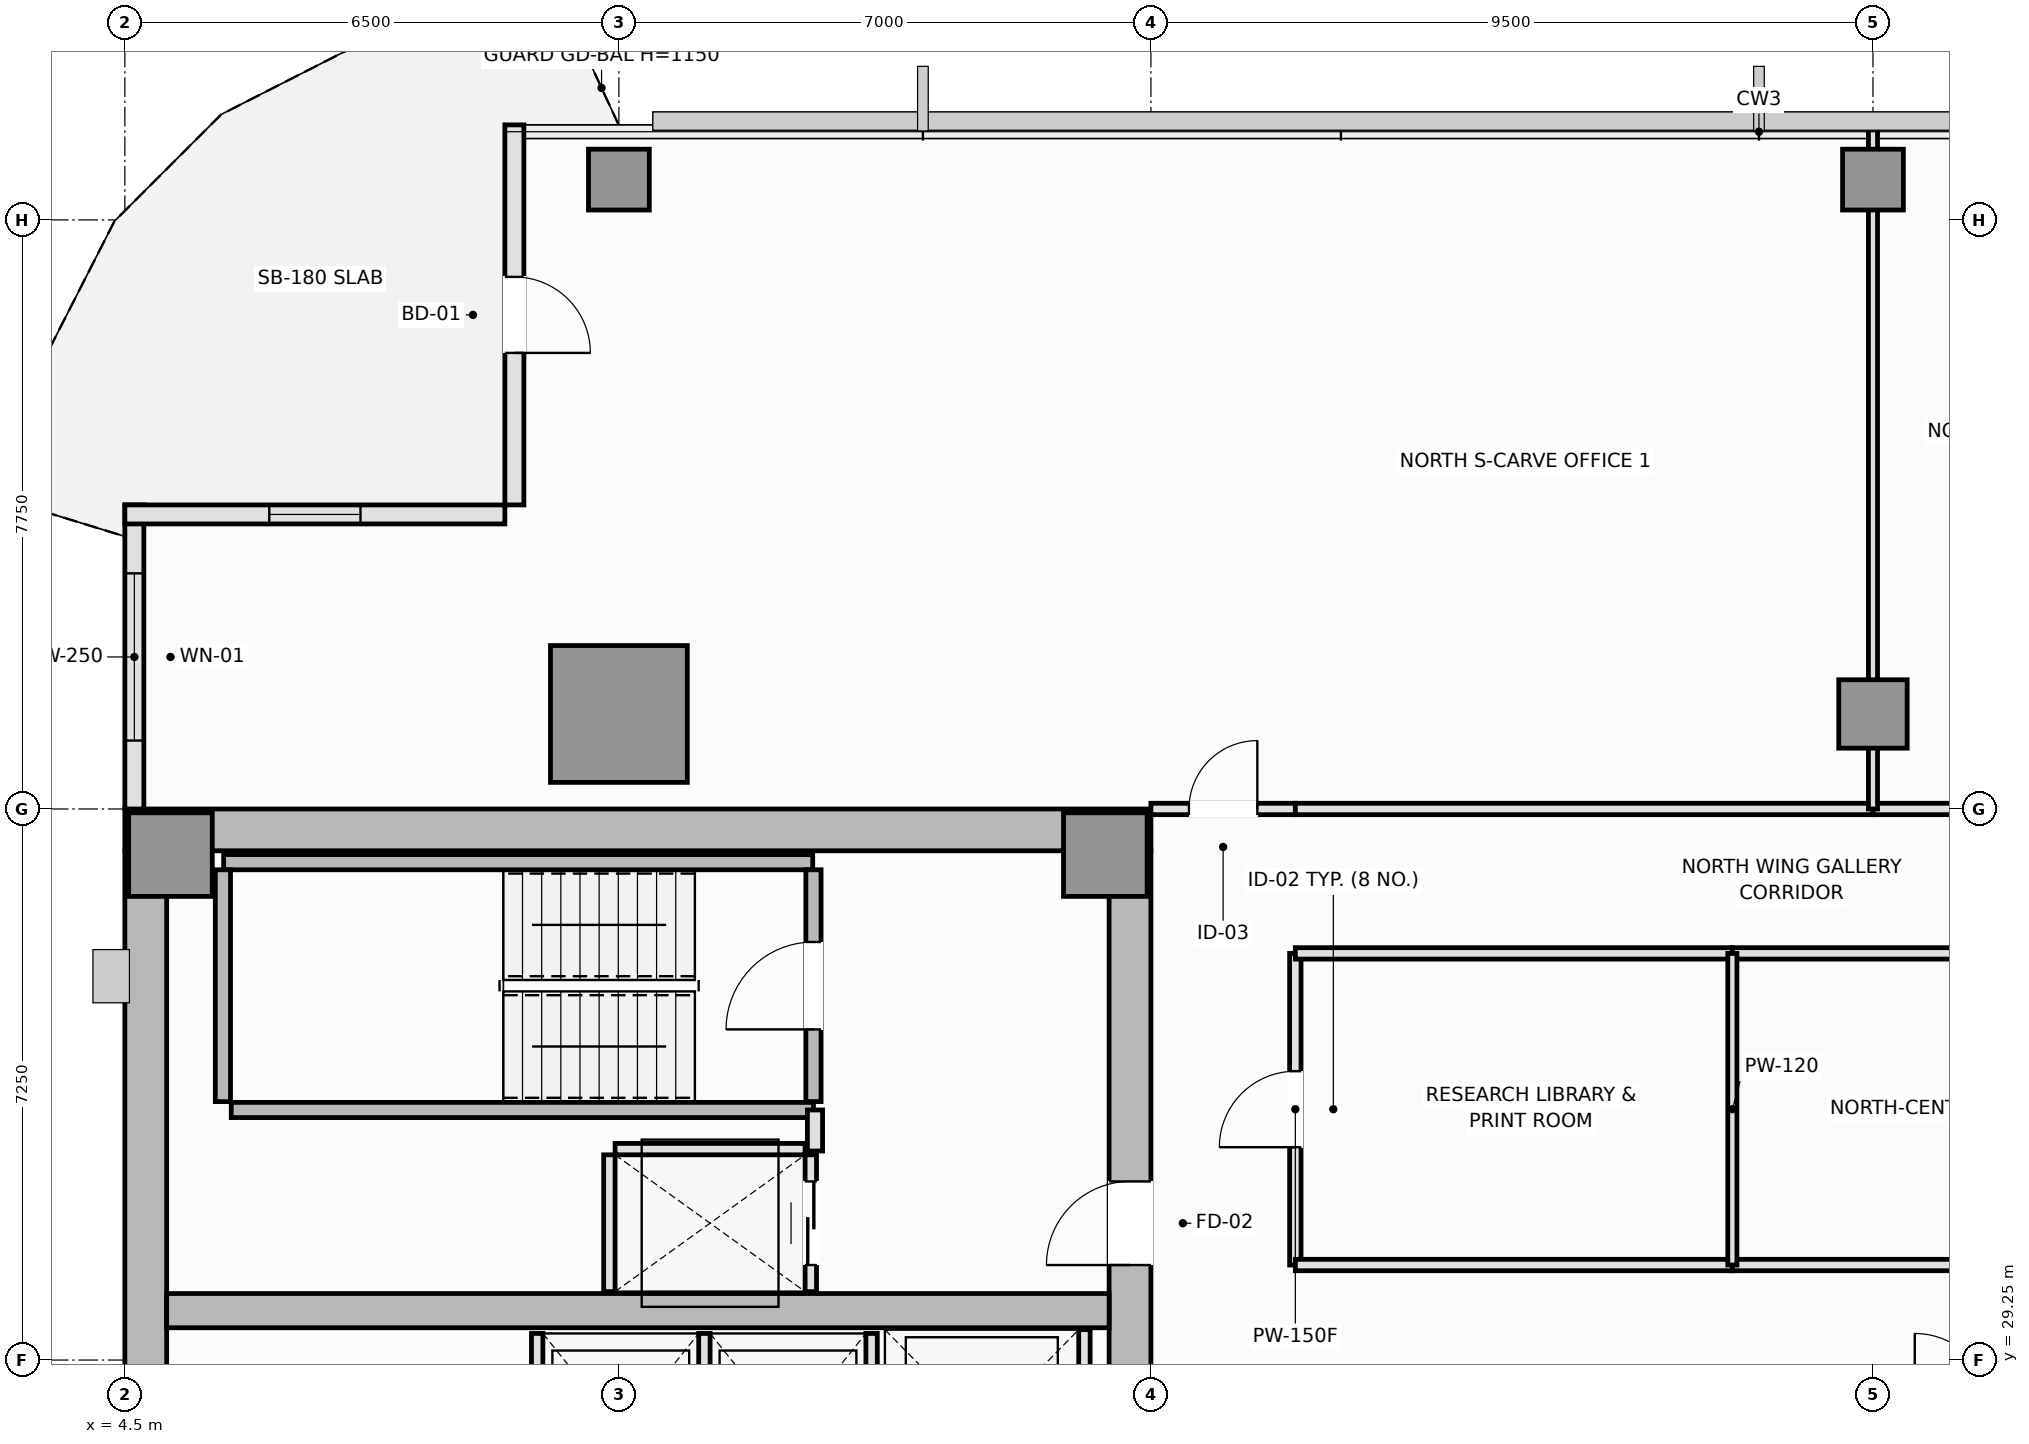
"""IFC4 building model, lengths in metres.
Left out: names, types, materials, properties, quantities, classifications, styles, units other than length and angle.
Written with IfcOpenShell. Run it as: python <this file> out.ifc"""

import sys

from ifc_helpers import new_model, si_unit, direction, frame, frame_2d, origin, origin_2d, place, context, subcontext, project, spatial, rectangle, extrude, element, fill, save


model = new_model("IFC4")
c1 = context("Model", 3, precision=1e-05, world=origin(), true_north=direction((0.0, 1.0)))
c2 = subcontext(c1, "Body", "Model", "MODEL_VIEW")
j1 = project(units=[si_unit("LENGTHUNIT", "METRE"), si_unit("PLANEANGLEUNIT", "RADIAN")], contexts=[c1])
p1 = place(None, origin())
s1 = spatial("IfcSite", under=j1, at=p1, CompositionType="ELEMENT")
p2 = place(p1, origin())
s2 = spatial("IfcBuilding", under=s1, at=p2, CompositionType="ELEMENT")
p3 = place(p2, frame((0.0, 0.0, 234.2)))
s3 = spatial("IfcBuildingStorey", under=s2, at=p3, CompositionType="ELEMENT", Elevation=234.2)
p4 = place(p3, frame((4.5, 36.225, 0.0), z_axis=(0.0, 0.0, 1.0), x_axis=(1.0, 0.0, 0.0)))
e1 = element("IfcWall", 1, at=p4, inside=s3, PredefinedType="SHEAR", context=c2, shape_type="SweptSolid", body=[
    extrude(rectangle(XDim=13.5, YDim=0.55, at=frame_2d((6.75, 0.0))), origin(), (0.0, 0.0, 1.0), 3.55),
])
p5 = place(p3, frame((4.775, 14.55, 0.0), z_axis=(0.0, 0.0, 1.0), x_axis=(0.0, 1.0, 0.0)))
e2 = element("IfcWall", 2, at=p5, inside=s3, PredefinedType="SHEAR", context=c2, shape_type="SweptSolid", body=[
    extrude(rectangle(XDim=21.4, YDim=0.55, at=frame_2d((10.7, 0.0))), origin(), (0.0, 0.0, 1.0), 3.55),
])
p6 = place(p3, frame((17.725, 27.05, 0.0), z_axis=(0.0, 0.0, 1.0), x_axis=(0.0, 1.0, 0.0)))
e3 = element("IfcWall", 3, at=p6, inside=s3, PredefinedType="SHEAR", context=c2, shape_type="SweptSolid", body=[
    extrude(rectangle(XDim=8.9, YDim=0.55, at=frame_2d((4.45, 0.0))), origin(), (0.0, 0.0, 1.0), 3.55),
])
p7 = place(p6, frame((3.45, 0.0, 0.0)))
e4 = element("IfcOpeningElement", 4, at=p7, cuts=e3, PredefinedType="OPENING", context=c2, shape_type="SweptSolid", body=[
    extrude(rectangle(XDim=1.1, YDim=2.15, at=frame_2d((0.55, 1.075))), frame((0.0, 0.285, 0.0), z_axis=(0.0, -1.0, 0.0), x_axis=(1.0, 0.0, 0.0)), (0.0, 0.0, 1.0), 0.57),
])
p8 = place(p3, frame((5.05, 29.9, 0.0), z_axis=(0.0, 0.0, 1.0), x_axis=(1.0, 0.0, 0.0)))
e5 = element("IfcWall", 5, at=p8, inside=s3, PredefinedType="SHEAR", context=c2, shape_type="SweptSolid", body=[
    extrude(rectangle(XDim=12.4, YDim=0.45, at=frame_2d((6.2, 0.0))), origin(), (0.0, 0.0, 1.0), 3.55),
])
for number, where, z_axis, x_axis in (
    (6, (5.1, 35.9, 0.0), (0.0, 0.0, 1.0), (1.0, 0.0, 0.0)),
    (7, (17.4, 35.9, 0.0), (0.0, 0.0, 1.0), (1.0, 0.0, 0.0)),
):
    element("IfcColumn", number, at=place(p3, frame(where, z_axis=z_axis, x_axis=x_axis)), inside=s3, PredefinedType="PILASTER", context=c2, shape_type="SweptSolid", body=[
        extrude(rectangle(XDim=1.1, YDim=1.1, at=origin_2d()), origin(), (0.0, 0.0, 1.0), 3.55),
    ])
p9 = place(p3, frame((11.0, 37.75, 0.0), z_axis=(0.0, 0.0, 1.0), x_axis=(1.0, 0.0, 0.0)))
e8 = element("IfcColumn", 8, at=p9, inside=s3, PredefinedType="COLUMN", context=c2, shape_type="SweptSolid", body=[
    extrude(rectangle(XDim=1.8, YDim=1.8, at=origin_2d()), origin(), (0.0, 0.0, 1.0), 3.55),
])
p10 = place(p3, frame((27.5, 37.75, 0.0), z_axis=(0.0, 0.0, 1.0), x_axis=(1.0, 0.0, 0.0)))
e9 = element("IfcColumn", 9, at=p10, inside=s3, PredefinedType="COLUMN", context=c2, shape_type="SweptSolid", body=[
    extrude(rectangle(XDim=0.9, YDim=0.9, at=origin_2d()), origin(), (0.0, 0.0, 1.0), 3.55),
])
for number, where, z_axis, x_axis in (
    (10, (11.0, 44.78, 0.0), (0.0, 0.0, 1.0), (1.0, 0.0, 0.0)),
    (11, (27.5, 44.78, 0.0), (0.0, 0.0, 1.0), (1.0, 0.0, 0.0)),
):
    element("IfcColumn", number, at=place(p3, frame(where, z_axis=z_axis, x_axis=x_axis)), inside=s3, PredefinedType="COLUMN", context=c2, shape_type="SweptSolid", body=[
        extrude(rectangle(XDim=0.8, YDim=0.8, at=origin_2d()), origin(), (0.0, 0.0, 1.0), 3.55),
    ])
p11 = place(p3, frame((4.625, 40.5, 0.0), z_axis=(0.0, 0.0, 1.0), x_axis=(0.0, -1.0, 0.0)))
e12 = element("IfcWall", 12, at=p11, inside=s3, PredefinedType="SOLIDWALL", context=c2, shape_type="SweptSolid", body=[
    extrude(rectangle(XDim=4.0, YDim=0.25, at=frame_2d((2.0, 0.0))), origin(), (0.0, 0.0, 1.0), 3.37),
])
p12 = place(p11, frame((0.9, 0.0, 0.9)))
e13 = element("IfcOpeningElement", 13, at=p12, cuts=e12, PredefinedType="OPENING", context=c2, shape_type="SweptSolid", body=[
    extrude(rectangle(XDim=2.2, YDim=1.8, at=frame_2d((1.1, 0.9))), frame((0.0, 0.135, 0.0), z_axis=(0.0, -1.0, 0.0), x_axis=(1.0, 0.0, 0.0)), (0.0, 0.0, 1.0), 0.27),
])
p13 = place(p3, frame((9.625, 45.5, 0.0), z_axis=(0.0, 0.0, 1.0), x_axis=(0.0, -1.0, 0.0)))
e14 = element("IfcWall", 14, at=p13, inside=s3, PredefinedType="SOLIDWALL", context=c2, shape_type="SweptSolid", body=[
    extrude(rectangle(XDim=5.0, YDim=0.25, at=frame_2d((2.5, 0.0))), origin(), (0.0, 0.0, 1.0), 3.1),
])
p14 = place(p13, frame((2.0, 0.0, 0.0)))
e15 = element("IfcOpeningElement", 15, at=p14, cuts=e14, PredefinedType="OPENING", context=c2, shape_type="SweptSolid", body=[
    extrude(rectangle(XDim=1.0, YDim=2.2, at=frame_2d((0.5, 1.1))), frame((0.0, 0.135, 0.0), z_axis=(0.0, -1.0, 0.0), x_axis=(1.0, 0.0, 0.0)), (0.0, 0.0, 1.0), 0.27),
])
p15 = place(p3, frame((9.5, 40.375, 0.0), z_axis=(0.0, 0.0, 1.0), x_axis=(-1.0, 0.0, 0.0)))
e16 = element("IfcWall", 16, at=p15, inside=s3, PredefinedType="SOLIDWALL", context=c2, shape_type="SweptSolid", body=[
    extrude(rectangle(XDim=5.0, YDim=0.25, at=frame_2d((2.5, 0.0))), origin(), (0.0, 0.0, 1.0), 3.37),
])
p16 = place(p15, frame((1.9, 0.0, 0.9)))
e17 = element("IfcOpeningElement", 17, at=p16, cuts=e16, PredefinedType="OPENING", context=c2, shape_type="SweptSolid", body=[
    extrude(rectangle(XDim=1.2, YDim=1.8, at=frame_2d((0.6, 0.9))), frame((0.0, 0.135, 0.0), z_axis=(0.0, -1.0, 0.0), x_axis=(1.0, 0.0, 0.0)), (0.0, 0.0, 1.0), 0.27),
])
p17 = place(p3, frame((5.8, 35.8, 0.0), z_axis=(0.0, 0.0, 1.0), x_axis=(1.0, 0.0, 0.0)))
e18 = element("IfcWall", 18, at=p17, inside=s3, PredefinedType="SOLIDWALL", context=c2, shape_type="SweptSolid", body=[
    extrude(rectangle(XDim=7.75, YDim=0.2, at=frame_2d((3.875, 0.0))), origin(), (0.0, 0.0, 1.0), 3.55),
])
p18 = place(p3, frame((5.79, 32.65, 0.0), z_axis=(0.0, 0.0, 1.0), x_axis=(0.0, 1.0, 0.0)))
e19 = element("IfcWall", 19, at=p18, inside=s3, PredefinedType="SOLIDWALL", context=c2, shape_type="SweptSolid", body=[
    extrude(rectangle(XDim=3.05, YDim=0.2, at=frame_2d((1.525, 0.0))), origin(), (0.0, 0.0, 1.0), 3.55),
])
p19 = place(p3, frame((5.9, 32.54, 0.0), z_axis=(0.0, 0.0, 1.0), x_axis=(1.0, 0.0, 0.0)))
e20 = element("IfcWall", 20, at=p19, inside=s3, PredefinedType="SOLIDWALL", context=c2, shape_type="SweptSolid", body=[
    extrude(rectangle(XDim=7.66, YDim=0.2, at=frame_2d((3.83, 0.0))), origin(), (0.0, 0.0, 1.0), 3.55),
])
p20 = place(p3, frame((13.56, 32.65, 0.0), z_axis=(0.0, 0.0, 1.0), x_axis=(0.0, 1.0, 0.0)))
e21 = element("IfcWall", 21, at=p20, inside=s3, PredefinedType="SOLIDWALL", context=c2, shape_type="SweptSolid", body=[
    extrude(rectangle(XDim=3.05, YDim=0.2, at=frame_2d((1.525, 0.0))), origin(), (0.0, 0.0, 1.0), 3.55),
])
p21 = place(p20, frame((0.95, 0.0, 0.0)))
e22 = element("IfcOpeningElement", 22, at=p21, cuts=e21, PredefinedType="OPENING", context=c2, shape_type="SweptSolid", body=[
    extrude(rectangle(XDim=1.15, YDim=2.15, at=frame_2d((0.575, 1.075))), frame((0.0, 0.11, 0.0), z_axis=(0.0, -1.0, 0.0), x_axis=(1.0, 0.0, 0.0)), (0.0, 0.0, 1.0), 0.22),
])
for number, where, z_axis, x_axis in (
    (23, (9.925, 27.05, 0.0), (0.0, 0.0, 1.0), (0.0, 1.0, 0.0)),
    (24, (12.125, 27.05, 0.0), (0.0, 0.0, 1.0), (0.0, 1.0, 0.0)),
    (25, (14.325, 27.05, 0.0), (0.0, 0.0, 1.0), (0.0, 1.0, 0.0)),
):
    element("IfcWall", number, at=place(p3, frame(where, z_axis=z_axis, x_axis=x_axis)), inside=s3, PredefinedType="PARTITIONING", context=c2, shape_type="SweptSolid", body=[
        extrude(rectangle(XDim=2.55, YDim=0.15, at=frame_2d((1.275, 0.0))), origin(), (0.0, 0.0, 1.0), 3.37),
    ])
p22 = place(p3, frame((17.125, 27.05, 0.0), z_axis=(0.0, 0.0, 1.0), x_axis=(0.0, 1.0, 0.0)))
e26 = element("IfcWall", 26, at=p22, inside=s3, PredefinedType="PARTITIONING", context=c2, shape_type="SweptSolid", body=[
    extrude(rectangle(XDim=2.6, YDim=0.15, at=frame_2d((1.3, 0.0))), origin(), (0.0, 0.0, 1.0), 3.37),
])
p23 = place(p3, frame((10.95, 32.025, 0.0), z_axis=(0.0, 0.0, 1.0), x_axis=(1.0, 0.0, 0.0)))
e27 = element("IfcWall", 27, at=p23, inside=s3, PredefinedType="PARTITIONING", context=c2, shape_type="SweptSolid", body=[
    extrude(rectangle(XDim=2.5, YDim=0.15, at=frame_2d((1.25, 0.0))), origin(), (0.0, 0.0, 1.0), 3.37),
])
p24 = place(p3, frame((10.875, 30.15, 0.0), z_axis=(0.0, 0.0, 1.0), x_axis=(0.0, 1.0, 0.0)))
e28 = element("IfcWall", 28, at=p24, inside=s3, PredefinedType="PARTITIONING", context=c2, shape_type="SweptSolid", body=[
    extrude(rectangle(XDim=1.8, YDim=0.15, at=frame_2d((0.9, 0.0))), origin(), (0.0, 0.0, 1.0), 3.37),
])
p25 = place(p3, frame((13.525, 30.15, 0.0), z_axis=(0.0, 0.0, 1.0), x_axis=(0.0, 1.0, 0.0)))
e29 = element("IfcWall", 29, at=p25, inside=s3, PredefinedType="PARTITIONING", context=c2, shape_type="SweptSolid", body=[
    extrude(rectangle(XDim=1.8, YDim=0.15, at=frame_2d((0.9, 0.0))), origin(), (0.0, 0.0, 1.0), 3.37),
])
p26 = place(p25, frame((0.35, 0.0, 0.0)))
e30 = element("IfcOpeningElement", 30, at=p26, cuts=e29, PredefinedType="OPENING", context=c2, shape_type="SweptSolid", body=[
    extrude(rectangle(XDim=1.1, YDim=2.2, at=frame_2d((0.55, 1.1))), frame((0.0, 0.085, 0.0), z_axis=(0.0, -1.0, 0.0), x_axis=(1.0, 0.0, 0.0)), (0.0, 0.0, 1.0), 0.17),
])
p27 = place(p3, frame((13.58, 32.0, 0.0), z_axis=(0.0, 0.0, 1.0), x_axis=(0.0, 1.0, 0.0)))
e31 = element("IfcWall", 31, at=p27, inside=s3, PredefinedType="PARTITIONING", context=c2, shape_type="SweptSolid", body=[
    extrude(rectangle(XDim=0.54, YDim=0.2, at=frame_2d((0.27, 0.0))), origin(), (0.0, 0.0, 1.0), 3.37),
])
p28 = place(p3, frame((19.9, 30.5, 0.0), z_axis=(0.0, 0.0, 1.0), x_axis=(0.0, 1.0, 0.0)))
e32 = element("IfcWall", 32, at=p28, inside=s3, PredefinedType="PARTITIONING", context=c2, shape_type="SweptSolid", body=[
    extrude(rectangle(XDim=4.1, YDim=0.15, at=frame_2d((2.05, 0.0))), origin(), (0.0, 0.0, 1.0), 3.37),
])
p29 = place(p28, frame((1.55, 0.0, 0.0)))
e33 = element("IfcOpeningElement", 33, at=p29, cuts=e32, PredefinedType="OPENING", context=c2, shape_type="SweptSolid", body=[
    extrude(rectangle(XDim=1.0, YDim=2.15, at=frame_2d((0.5, 1.075))), frame((0.0, 0.085, 0.0), z_axis=(0.0, -1.0, 0.0), x_axis=(1.0, 0.0, 0.0)), (0.0, 0.0, 1.0), 0.17),
])
p30 = place(p3, frame((18.0, 36.5, 0.0), z_axis=(0.0, 0.0, 1.0), x_axis=(1.0, 0.0, 0.0)))
e34 = element("IfcWall", 34, at=p30, inside=s3, PredefinedType="PARTITIONING", context=c2, shape_type="SweptSolid", body=[
    extrude(rectangle(XDim=1.9, YDim=0.15, at=frame_2d((0.95, 0.0))), origin(), (0.0, 0.0, 1.0), 3.37),
])
p31 = place(p30, frame((0.5, 0.0, 0.0)))
e35 = element("IfcOpeningElement", 35, at=p31, cuts=e34, PredefinedType="OPENING", context=c2, shape_type="SweptSolid", body=[
    extrude(rectangle(XDim=0.9, YDim=2.1, at=frame_2d((0.45, 1.05))), frame((0.0, 0.085, 0.0), z_axis=(0.0, -1.0, 0.0), x_axis=(1.0, 0.0, 0.0)), (0.0, 0.0, 1.0), 0.17),
])
p32 = place(p3, frame((19.9, 30.5, 0.0), z_axis=(0.0, 0.0, 1.0), x_axis=(1.0, 0.0, 0.0)))
e36 = element("IfcWall", 36, at=p32, inside=s3, PredefinedType="PARTITIONING", context=c2, shape_type="SweptSolid", body=[
    extrude(rectangle(XDim=5.75, YDim=0.15, at=frame_2d((2.875, 0.0))), origin(), (0.0, 0.0, 1.0), 3.37),
])
p33 = place(p3, frame((25.65, 30.5, 0.0), z_axis=(0.0, 0.0, 1.0), x_axis=(1.0, 0.0, 0.0)))
e37 = element("IfcWall", 37, at=p33, inside=s3, PredefinedType="PARTITIONING", context=c2, shape_type="SweptSolid", body=[
    extrude(rectangle(XDim=7.95, YDim=0.15, at=frame_2d((3.975, 0.0))), origin(), (0.0, 0.0, 1.0), 3.37),
])
p34 = place(p3, frame((19.9, 34.6, 0.0), z_axis=(0.0, 0.0, 1.0), x_axis=(1.0, 0.0, 0.0)))
e38 = element("IfcWall", 38, at=p34, inside=s3, PredefinedType="PARTITIONING", context=c2, shape_type="SweptSolid", body=[
    extrude(rectangle(XDim=5.75, YDim=0.15, at=frame_2d((2.875, 0.0))), origin(), (0.0, 0.0, 1.0), 3.37),
])
p35 = place(p3, frame((25.65, 34.6, 0.0), z_axis=(0.0, 0.0, 1.0), x_axis=(1.0, 0.0, 0.0)))
e39 = element("IfcWall", 39, at=p35, inside=s3, PredefinedType="PARTITIONING", context=c2, shape_type="SweptSolid", body=[
    extrude(rectangle(XDim=7.95, YDim=0.15, at=frame_2d((3.975, 0.0))), origin(), (0.0, 0.0, 1.0), 3.37),
])
p36 = place(p3, frame((19.9, 36.5, 0.0), z_axis=(0.0, 0.0, 1.0), x_axis=(1.0, 0.0, 0.0)))
e40 = element("IfcWall", 40, at=p36, inside=s3, PredefinedType="PARTITIONING", context=c2, shape_type="SweptSolid", body=[
    extrude(rectangle(XDim=7.6, YDim=0.15, at=frame_2d((3.8, 0.0))), origin(), (0.0, 0.0, 1.0), 3.37),
])
p37 = place(p3, frame((27.5, 36.5, 0.0), z_axis=(0.0, 0.0, 1.0), x_axis=(1.0, 0.0, 0.0)))
e41 = element("IfcWall", 41, at=p37, inside=s3, PredefinedType="PARTITIONING", context=c2, shape_type="SweptSolid", body=[
    extrude(rectangle(XDim=3.5, YDim=0.15, at=frame_2d((1.75, 0.0))), origin(), (0.0, 0.0, 1.0), 3.37),
])
p38 = place(p37, frame((1.25, 0.0, 0.0)))
e42 = element("IfcOpeningElement", 42, at=p38, cuts=e41, PredefinedType="OPENING", context=c2, shape_type="SweptSolid", body=[
    extrude(rectangle(XDim=1.0, YDim=2.15, at=frame_2d((0.5, 1.075))), frame((0.0, 0.085, 0.0), z_axis=(0.0, -1.0, 0.0), x_axis=(1.0, 0.0, 0.0)), (0.0, 0.0, 1.0), 0.17),
])
p39 = place(p3, frame((25.65, 30.5, 0.0), z_axis=(0.0, 0.0, 1.0), x_axis=(0.0, 1.0, 0.0)))
e43 = element("IfcWall", 43, at=p39, inside=s3, PredefinedType="PARTITIONING", context=c2, shape_type="SweptSolid", body=[
    extrude(rectangle(XDim=4.1, YDim=0.12, at=frame_2d((2.05, 0.0))), origin(), (0.0, 0.0, 1.0), 3.07),
])
p40 = place(p3, frame((27.5, 36.5, 0.0), z_axis=(0.0, 0.0, 1.0), x_axis=(0.0, 1.0, 0.0)))
e44 = element("IfcWall", 44, at=p40, inside=s3, PredefinedType="PARTITIONING", context=c2, shape_type="SweptSolid", body=[
    extrude(rectangle(XDim=8.99, YDim=0.12, at=frame_2d((4.495, 0.0))), origin(), (0.0, 0.0, 1.0), 2.92),
])
p41 = place(p12, origin())
e45 = element("IfcWindow", 45, at=p41, inside=s3, PartitioningType="SINGLE_PANEL", PredefinedType="WINDOW", context=c2, shape_type="SweptSolid", body=[
    extrude(rectangle(XDim=2.2, YDim=1.8, at=frame_2d((1.1, 0.9))), frame((0.0, 0.03, 0.0), z_axis=(0.0, -1.0, 0.0), x_axis=(1.0, 0.0, 0.0)), (0.0, 0.0, 1.0), 0.06),
])
fill(e13, e45)
p42 = place(p14, frame((1.0, 0.0, 0.0), z_axis=(0.0, 0.0, 1.0), x_axis=(-1.0, 0.0, 0.0)))
e46 = element("IfcDoor", 46, at=p42, inside=s3, OperationType="SINGLE_SWING_RIGHT", PredefinedType="DOOR", context=c2, shape_type="SweptSolid", body=[
    extrude(rectangle(XDim=1.0, YDim=2.2, at=frame_2d((0.5, 1.1))), frame((0.0, 0.025, 0.0), z_axis=(0.0, -1.0, 0.0), x_axis=(1.0, 0.0, 0.0)), (0.0, 0.0, 1.0), 0.05),
])
fill(e15, e46)
p43 = place(p16, origin())
e47 = element("IfcWindow", 47, at=p43, inside=s3, PartitioningType="SINGLE_PANEL", PredefinedType="WINDOW", context=c2, shape_type="SweptSolid", body=[
    extrude(rectangle(XDim=1.2, YDim=1.8, at=frame_2d((0.6, 0.9))), frame((0.0, 0.03, 0.0), z_axis=(0.0, -1.0, 0.0), x_axis=(1.0, 0.0, 0.0)), (0.0, 0.0, 1.0), 0.06),
])
fill(e17, e47)
p44 = place(p21, origin())
e48 = element("IfcDoor", 48, at=p44, inside=s3, OperationType="SINGLE_SWING_LEFT", PredefinedType="DOOR", context=c2, shape_type="SweptSolid", body=[
    extrude(rectangle(XDim=1.15, YDim=2.15, at=frame_2d((0.575, 1.075))), frame((0.0, 0.025, 0.0), z_axis=(0.0, -1.0, 0.0), x_axis=(1.0, 0.0, 0.0)), (0.0, 0.0, 1.0), 0.05),
])
fill(e22, e48)
p45 = place(p26, origin())
e49 = element("IfcDoor", 49, at=p45, inside=s3, OperationType="DOUBLE_DOOR_SLIDING", PredefinedType="DOOR", context=c2, shape_type="SweptSolid", body=[
    extrude(rectangle(XDim=1.1, YDim=2.2, at=frame_2d((0.55, 1.1))), frame((0.0, 0.025, 0.0), z_axis=(0.0, -1.0, 0.0), x_axis=(1.0, 0.0, 0.0)), (0.0, 0.0, 1.0), 0.05),
])
fill(e30, e49)
p46 = place(p7, origin())
e50 = element("IfcDoor", 50, at=p46, inside=s3, OperationType="SINGLE_SWING_LEFT", PredefinedType="DOOR", context=c2, shape_type="SweptSolid", body=[
    extrude(rectangle(XDim=1.1, YDim=2.15, at=frame_2d((0.55, 1.075))), frame((0.0, 0.025, 0.0), z_axis=(0.0, -1.0, 0.0), x_axis=(1.0, 0.0, 0.0)), (0.0, 0.0, 1.0), 0.05),
])
fill(e4, e50)
p47 = place(p29, origin())
e51 = element("IfcDoor", 51, at=p47, inside=s3, OperationType="SINGLE_SWING_LEFT", PredefinedType="DOOR", context=c2, shape_type="SweptSolid", body=[
    extrude(rectangle(XDim=1.0, YDim=2.15, at=frame_2d((0.5, 1.075))), frame((0.0, 0.025, 0.0), z_axis=(0.0, -1.0, 0.0), x_axis=(1.0, 0.0, 0.0)), (0.0, 0.0, 1.0), 0.05),
])
fill(e33, e51)
p48 = place(p31, origin())
e52 = element("IfcDoor", 52, at=p48, inside=s3, OperationType="SINGLE_SWING_RIGHT", PredefinedType="DOOR", context=c2, shape_type="SweptSolid", body=[
    extrude(rectangle(XDim=0.9, YDim=2.1, at=frame_2d((0.45, 1.05))), frame((0.0, 0.025, 0.0), z_axis=(0.0, -1.0, 0.0), x_axis=(1.0, 0.0, 0.0)), (0.0, 0.0, 1.0), 0.05),
])
fill(e35, e52)
save(model, sys.argv[1])
